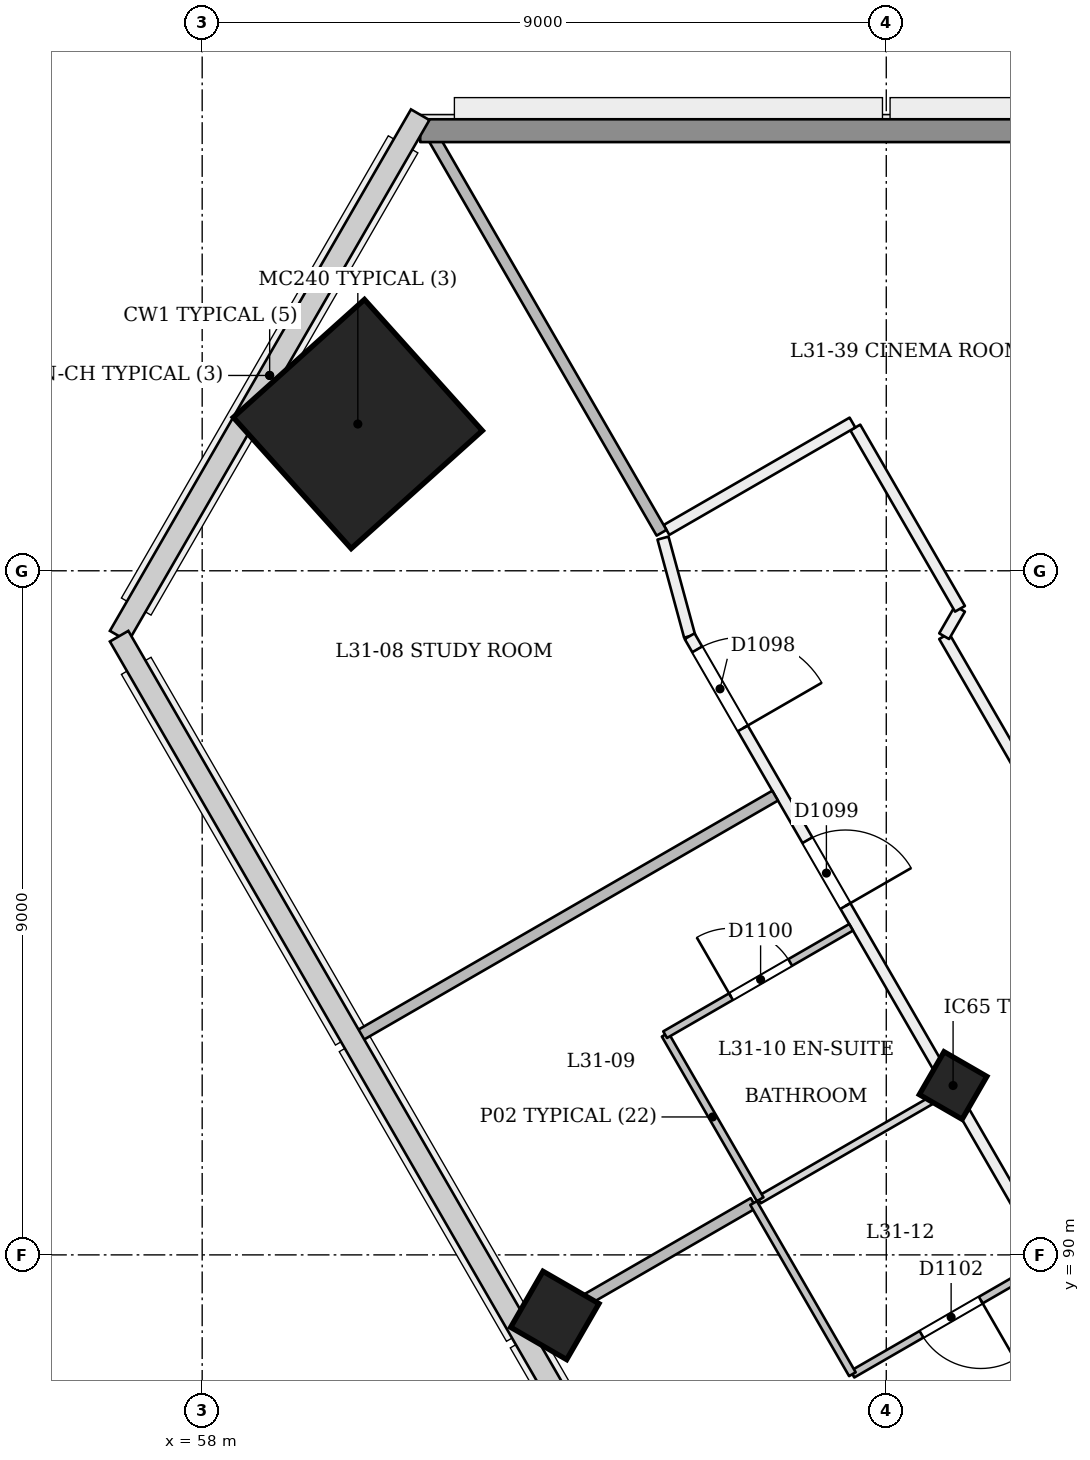
"""IFC4 building model, lengths in metres.
Left out: names, types, materials, properties, quantities, classifications, styles, units other than length and angle.
Written with IfcOpenShell. Run it as: python <this file> out.ifc"""

import sys

from ifc_helpers import new_model, si_unit, direction, frame, frame_2d, origin, origin_2d, place, context, subcontext, project, spatial, rectangle, extrude, element, fill, save


model = new_model("IFC4")
c1 = context("Model", 3, precision=1e-05, world=origin(), true_north=direction((0.0, 1.0)))
c2 = subcontext(c1, "Body", "Model", "MODEL_VIEW")
j1 = project(units=[si_unit("LENGTHUNIT", "METRE"), si_unit("PLANEANGLEUNIT", "RADIAN")], contexts=[c1])
p1 = place(None, origin())
s1 = spatial("IfcSite", under=j1, at=p1, CompositionType="ELEMENT")
p2 = place(p1, origin())
s2 = spatial("IfcBuilding", under=s1, at=p2, CompositionType="ELEMENT")
p3 = place(p2, frame((0.0, 0.0, 124.2)))
s3 = spatial("IfcBuildingStorey", under=s2, at=p3, CompositionType="ELEMENT", Elevation=124.2)
p4 = place(p3, frame((67.852, 92.181, -0.02), z_axis=(0.022221406801, 0.038413224561, 0.999014831351), x_axis=(-0.866024065394, -0.498523117158, 0.038432015521)))
e1 = element("IfcColumn", 1, at=p4, inside=s3, PredefinedType="COLUMN", context=c2, shape_type="SweptSolid", body=[
    extrude(rectangle(XDim=0.65, YDim=0.65, at=origin_2d()), origin(), (0.0, 0.0, 1.0), 3.604),
])
p5 = place(p3, frame((60.014, 100.92, 0.0), z_axis=(0.028334066552, 0.009286524205, 0.999555371723), x_axis=(-0.86655567717, 0.498682281887, 0.019930882981)))
e2 = element("IfcColumn", 2, at=p5, inside=s3, PredefinedType="COLUMN", context=c2, shape_type="SweptSolid", body=[
    extrude(rectangle(XDim=2.32, YDim=2.32, at=origin_2d()), origin(), (0.0, 0.0, 1.0), 3.602),
])
p6 = place(p3, frame((62.612, 89.156, -0.026), z_axis=(0.022222852987, 0.038483477124, 0.999012095419), x_axis=(-0.86564204084, -0.499182068467, 0.038485317347)))
e3 = element("IfcColumn", 3, at=p6, inside=s3, PredefinedType="COLUMN", context=c2, shape_type="SweptSolid", body=[
    extrude(rectangle(XDim=0.85, YDim=0.85, at=origin_2d()), origin(), (0.0, 0.0, 1.0), 3.604),
])
p7 = place(p3, frame((64.062, 99.43, 0.0), z_axis=(0.0, 0.0, 1.0), x_axis=(0.261989498523, -0.965070724177, 0.0)))
e4 = element("IfcWall", 4, at=p7, inside=s3, PredefinedType="PARTITIONING", context=c2, shape_type="SweptSolid", body=[
    extrude(rectangle(XDim=1.337, YDim=0.15, at=frame_2d((0.668, 0.0))), origin(), (0.0, 0.0, 1.0), 3.15),
])
p8 = place(p3, frame((64.413, 98.139, 0.0), z_axis=(0.0, 0.0, 1.0), x_axis=(0.500003831119, -0.866023191876, 0.0)))
e5 = element("IfcWall", 5, at=p8, inside=s3, PredefinedType="PARTITIONING", context=c2, shape_type="SweptSolid", body=[
    extrude(rectangle(XDim=40.758, YDim=0.15, at=frame_2d((20.379, 0.0))), origin(), (0.0, 0.0, 1.0), 2.75),
])
p9 = place(p8, frame((0.2, 0.0, 0.0)))
e6 = element("IfcOpeningElement", 6, at=p9, cuts=e5, PredefinedType="OPENING", context=c2, shape_type="SweptSolid", body=[
    extrude(rectangle(XDim=1.2, YDim=2.1, at=frame_2d((0.6, 1.05))), frame((0.0, 0.085, 0.0), z_axis=(0.0, -1.0, 0.0), x_axis=(1.0, 0.0, 0.0)), (0.0, 0.0, 1.0), 0.171),
])
p10 = place(p8, frame((3.099, 0.0, 0.0)))
e7 = element("IfcOpeningElement", 7, at=p10, cuts=e5, PredefinedType="OPENING", context=c2, shape_type="SweptSolid", body=[
    extrude(rectangle(XDim=1.0, YDim=2.1, at=frame_2d((0.5, 1.05))), frame((0.0, 0.085, 0.0), z_axis=(0.0, -1.0, 0.0), x_axis=(1.0, 0.0, 0.0)), (0.0, 0.0, 1.0), 0.171),
])
p11 = place(p8, frame((9.774, 0.0, 0.0)))
e8 = element("IfcOpeningElement", 8, at=p11, cuts=e5, PredefinedType="OPENING", context=c2, shape_type="SweptSolid", body=[
    extrude(rectangle(XDim=1.0, YDim=2.1, at=frame_2d((0.5, 1.05))), frame((0.0, 0.085, 0.0), z_axis=(0.0, -1.0, 0.0), x_axis=(1.0, 0.0, 0.0)), (0.0, 0.0, 1.0), 0.171),
])
p12 = place(p8, frame((11.984, 0.0, 0.0)))
e9 = element("IfcOpeningElement", 9, at=p12, cuts=e5, PredefinedType="OPENING", context=c2, shape_type="SweptSolid", body=[
    extrude(rectangle(XDim=1.0, YDim=2.1, at=frame_2d((0.5, 1.05))), frame((0.0, 0.085, 0.0), z_axis=(0.0, -1.0, 0.0), x_axis=(1.0, 0.0, 0.0)), (0.0, 0.0, 1.0), 0.171),
])
p13 = place(p8, frame((18.659, 0.0, 0.0)))
e10 = element("IfcOpeningElement", 10, at=p13, cuts=e5, PredefinedType="OPENING", context=c2, shape_type="SweptSolid", body=[
    extrude(rectangle(XDim=1.0, YDim=2.1, at=frame_2d((0.5, 1.05))), frame((0.0, 0.085, 0.0), z_axis=(0.0, -1.0, 0.0), x_axis=(1.0, 0.0, 0.0)), (0.0, 0.0, 1.0), 0.171),
])
p14 = place(p8, frame((22.129, 0.0, 0.0)))
e11 = element("IfcOpeningElement", 11, at=p14, cuts=e5, PredefinedType="OPENING", context=c2, shape_type="SweptSolid", body=[
    extrude(rectangle(XDim=1.0, YDim=2.1, at=frame_2d((0.5, 1.05))), frame((0.0, 0.085, 0.0), z_axis=(0.0, -1.0, 0.0), x_axis=(1.0, 0.0, 0.0)), (0.0, 0.0, 1.0), 0.171),
])
p15 = place(p8, frame((27.659, 0.0, 0.0)))
e12 = element("IfcOpeningElement", 12, at=p15, cuts=e5, PredefinedType="OPENING", context=c2, shape_type="SweptSolid", body=[
    extrude(rectangle(XDim=1.0, YDim=2.1, at=frame_2d((0.5, 1.05))), frame((0.0, 0.085, 0.0), z_axis=(0.0, -1.0, 0.0), x_axis=(1.0, 0.0, 0.0)), (0.0, 0.0, 1.0), 0.171),
])
p16 = place(p8, frame((31.129, 0.0, 0.0)))
e13 = element("IfcOpeningElement", 13, at=p16, cuts=e5, PredefinedType="OPENING", context=c2, shape_type="SweptSolid", body=[
    extrude(rectangle(XDim=1.0, YDim=2.1, at=frame_2d((0.5, 1.05))), frame((0.0, 0.085, 0.0), z_axis=(0.0, -1.0, 0.0), x_axis=(1.0, 0.0, 0.0)), (0.0, 0.0, 1.0), 0.171),
])
p17 = place(p8, frame((36.659, 0.0, 0.0)))
e14 = element("IfcOpeningElement", 14, at=p17, cuts=e5, PredefinedType="OPENING", context=c2, shape_type="SweptSolid", body=[
    extrude(rectangle(XDim=1.0, YDim=2.1, at=frame_2d((0.5, 1.05))), frame((0.0, 0.085, 0.0), z_axis=(0.0, -1.0, 0.0), x_axis=(1.0, 0.0, 0.0)), (0.0, 0.0, 1.0), 0.171),
])
p18 = place(p8, frame((39.445, 0.0, 0.0)))
e15 = element("IfcOpeningElement", 15, at=p18, cuts=e5, PredefinedType="OPENING", context=c2, shape_type="SweptSolid", body=[
    extrude(rectangle(XDim=1.0, YDim=2.1, at=frame_2d((0.5, 1.05))), frame((0.0, 0.085, 0.0), z_axis=(0.0, -1.0, 0.0), x_axis=(1.0, 0.0, 0.0)), (0.0, 0.0, 1.0), 0.171),
])
p19 = place(p3, frame((70.06, 94.158, 0.0), z_axis=(0.0, 0.0, 1.0), x_axis=(-0.500005941123, 0.866021973648, 0.0)))
e16 = element("IfcWall", 16, at=p19, inside=s3, PredefinedType="PARTITIONING", context=c2, shape_type="SweptSolid", body=[
    extrude(rectangle(XDim=4.597, YDim=0.15, at=frame_2d((2.299, 0.0))), origin(), (0.0, 0.0, 1.0), 3.15),
])
p20 = place(p3, frame((67.761, 98.139, 0.0), z_axis=(0.0, 0.0, 1.0), x_axis=(0.49967168172, 0.866214875471, 0.0)))
e17 = element("IfcWall", 17, at=p20, inside=s3, PredefinedType="PARTITIONING", context=c2, shape_type="SweptSolid", body=[
    extrude(rectangle(XDim=0.416, YDim=0.15, at=frame_2d((0.208, 0.0))), origin(), (0.0, 0.0, 1.0), 3.15),
])
p21 = place(p3, frame((67.969, 98.5, 0.0), z_axis=(0.0, 0.0, 1.0), x_axis=(-0.499991038717, 0.866030577522, 0.0)))
e18 = element("IfcWall", 18, at=p21, inside=s3, PredefinedType="PARTITIONING", context=c2, shape_type="SweptSolid", body=[
    extrude(rectangle(XDim=2.754, YDim=0.15, at=frame_2d((1.377, 0.0))), origin(), (0.0, 0.0, 1.0), 3.15),
])
p22 = place(p3, frame((66.555, 100.95, 0.0), z_axis=(0.0, 0.0, 1.0), x_axis=(-0.866048868473, -0.499959355765, 0.0)))
e19 = element("IfcWall", 19, at=p22, inside=s3, PredefinedType="PARTITIONING", context=c2, shape_type="SweptSolid", body=[
    extrude(rectangle(XDim=2.825, YDim=0.15, at=frame_2d((1.413, 0.0))), origin(), (0.0, 0.0, 1.0), 3.15),
])
p23 = place(p3, frame((60.042, 92.869, 0.0), z_axis=(0.0, 0.0, 1.0), x_axis=(0.866025401434, 0.500000004071, 0.0)))
e20 = element("IfcWall", 20, at=p23, inside=s3, PredefinedType="PARTITIONING", context=c2, shape_type="SweptSolid", body=[
    extrude(rectangle(XDim=6.345, YDim=0.15, at=frame_2d((3.173, 0.0))), origin(), (0.0, 0.0, 1.0), 2.65),
])
p24 = place(p3, frame((64.044, 99.5, 0.0), z_axis=(0.0, 0.0, 1.0), x_axis=(-0.500004896655, 0.866022576681, 0.0)))
e21 = element("IfcWall", 21, at=p24, inside=s3, PredefinedType="PARTITIONING", context=c2, shape_type="SweptSolid", body=[
    extrude(rectangle(XDim=6.235, YDim=0.15, at=frame_2d((3.118, 0.0))), origin(), (0.0, 0.0, 1.0), 2.65),
])
p25 = place(p3, frame((65.341, 90.732, 0.0), z_axis=(0.0, 0.0, 1.0), x_axis=(-0.500004234368, 0.866022959057, 0.0)))
e22 = element("IfcWall", 22, at=p25, inside=s3, PredefinedType="PARTITIONING", context=c2, shape_type="SweptSolid", body=[
    extrude(rectangle(XDim=2.5, YDim=0.1, at=frame_2d((1.25, 0.0))), origin(), (0.0, 0.0, 1.0), 2.75),
])
p26 = place(p3, frame((64.091, 92.897, 0.0), z_axis=(0.0, 0.0, 1.0), x_axis=(0.866048868473, 0.499959355765, 0.0)))
e23 = element("IfcWall", 23, at=p26, inside=s3, PredefinedType="PARTITIONING", context=c2, shape_type="SweptSolid", body=[
    extrude(rectangle(XDim=2.825, YDim=0.1, at=frame_2d((1.413, 0.0))), origin(), (0.0, 0.0, 1.0), 3.15),
])
p27 = place(p26, frame((1.0, 0.0, 0.0)))
e24 = element("IfcOpeningElement", 24, at=p27, cuts=e23, PredefinedType="OPENING", context=c2, shape_type="SweptSolid", body=[
    extrude(rectangle(XDim=0.9, YDim=2.1, at=frame_2d((0.45, 1.05))), frame((0.0, 0.061, 0.0), z_axis=(0.0, -1.0, 0.0), x_axis=(1.0, 0.0, 0.0)), (0.0, 0.0, 1.0), 0.121),
])
p28 = place(p3, frame((62.31, 88.982, 0.0), z_axis=(0.0, 0.0, 1.0), x_axis=(0.866038511948, 0.499977295307, 0.0)))
e25 = element("IfcWall", 25, at=p28, inside=s3, PredefinedType="PARTITIONING", context=c2, shape_type="SweptSolid", body=[
    extrude(rectangle(XDim=3.4, YDim=0.15, at=frame_2d((1.7, 0.0))), origin(), (0.0, 0.0, 1.0), 2.65),
])
p29 = place(p3, frame((65.323, 90.722, 0.0), z_axis=(0.0, 0.0, 1.0), x_axis=(0.866048401274, 0.499960165064, 0.0)))
e26 = element("IfcWall", 26, at=p29, inside=s3, PredefinedType="PARTITIONING", context=c2, shape_type="SweptSolid", body=[
    extrude(rectangle(XDim=2.845, YDim=0.1, at=frame_2d((1.422, 0.0))), origin(), (0.0, 0.0, 1.0), 2.75),
])
p30 = place(p3, frame((69.087, 89.893, 0.0), z_axis=(0.0, 0.0, 1.0), x_axis=(-0.866046596414, -0.499963291492, 0.0)))
e27 = element("IfcWall", 27, at=p30, inside=s3, PredefinedType="PARTITIONING", context=c2, shape_type="SweptSolid", body=[
    extrude(rectangle(XDim=2.925, YDim=0.1, at=frame_2d((1.462, 0.0))), origin(), (0.0, 0.0, 1.0), 3.15),
])
p31 = place(p30, frame((0.975, 0.0, 0.0)))
e28 = element("IfcOpeningElement", 28, at=p31, cuts=e27, PredefinedType="OPENING", context=c2, shape_type="SweptSolid", body=[
    extrude(rectangle(XDim=0.9, YDim=2.1, at=frame_2d((0.45, 1.05))), frame((0.0, 0.061, 0.0), z_axis=(0.0, -1.0, 0.0), x_axis=(1.0, 0.0, 0.0)), (0.0, 0.0, 1.0), 0.121),
])
p32 = place(p3, frame((66.554, 88.43, 0.0), z_axis=(0.0, 0.0, 1.0), x_axis=(-0.499936506574, 0.866062058628, 0.0)))
e29 = element("IfcWall", 29, at=p32, inside=s3, PredefinedType="PARTITIONING", context=c2, shape_type="SweptSolid", body=[
    extrude(rectangle(XDim=2.6, YDim=0.1, at=frame_2d((1.3, 0.0))), origin(), (0.0, 0.0, 1.0), 2.75),
])
p33 = place(p3, frame((60.868, 104.79, 0.0), z_axis=(0.0, 0.0, 1.0), x_axis=(1.0, 0.0, 0.0)))
e30 = element("IfcWall", 30, at=p33, inside=s3, PredefinedType="SOLIDWALL", context=c2, shape_type="SweptSolid", body=[
    extrude(rectangle(XDim=48.264, YDim=0.3, at=frame_2d((24.132, 0.0))), origin(), (0.0, 0.0, 1.0), 2.65),
])
p34 = place(p9, origin())
e31 = element("IfcDoor", 31, at=p34, inside=s3, OperationType="SINGLE_SWING_RIGHT", PredefinedType="NOTDEFINED", context=c2, shape_type="SweptSolid", body=[
    extrude(rectangle(XDim=1.2, YDim=2.1, at=frame_2d((0.6, 1.05))), frame((0.0, 0.025, 0.0), z_axis=(0.0, -1.0, 0.0), x_axis=(1.0, 0.0, 0.0)), (0.0, 0.0, 1.0), 0.05),
])
fill(e6, e31)
p35 = place(p10, origin())
e32 = element("IfcDoor", 32, at=p35, inside=s3, OperationType="SINGLE_SWING_RIGHT", PredefinedType="NOTDEFINED", context=c2, shape_type="SweptSolid", body=[
    extrude(rectangle(XDim=1.0, YDim=2.1, at=frame_2d((0.5, 1.05))), frame((0.0, 0.025, 0.0), z_axis=(0.0, -1.0, 0.0), x_axis=(1.0, 0.0, 0.0)), (0.0, 0.0, 1.0), 0.05),
])
fill(e7, e32)
p36 = place(p27, origin())
e33 = element("IfcDoor", 33, at=p36, inside=s3, OperationType="SINGLE_SWING_LEFT", PredefinedType="NOTDEFINED", context=c2, shape_type="SweptSolid", body=[
    extrude(rectangle(XDim=0.9, YDim=2.1, at=frame_2d((0.45, 1.05))), frame((0.0, 0.025, 0.0), z_axis=(0.0, -1.0, 0.0), x_axis=(1.0, 0.0, 0.0)), (0.0, 0.0, 1.0), 0.05),
])
fill(e24, e33)
p37 = place(p31, origin())
e34 = element("IfcDoor", 34, at=p37, inside=s3, OperationType="SINGLE_SWING_LEFT", PredefinedType="NOTDEFINED", context=c2, shape_type="SweptSolid", body=[
    extrude(rectangle(XDim=0.9, YDim=2.1, at=frame_2d((0.45, 1.05))), frame((0.0, 0.025, 0.0), z_axis=(0.0, -1.0, 0.0), x_axis=(1.0, 0.0, 0.0)), (0.0, 0.0, 1.0), 0.05),
])
fill(e28, e34)
save(model, sys.argv[1])
